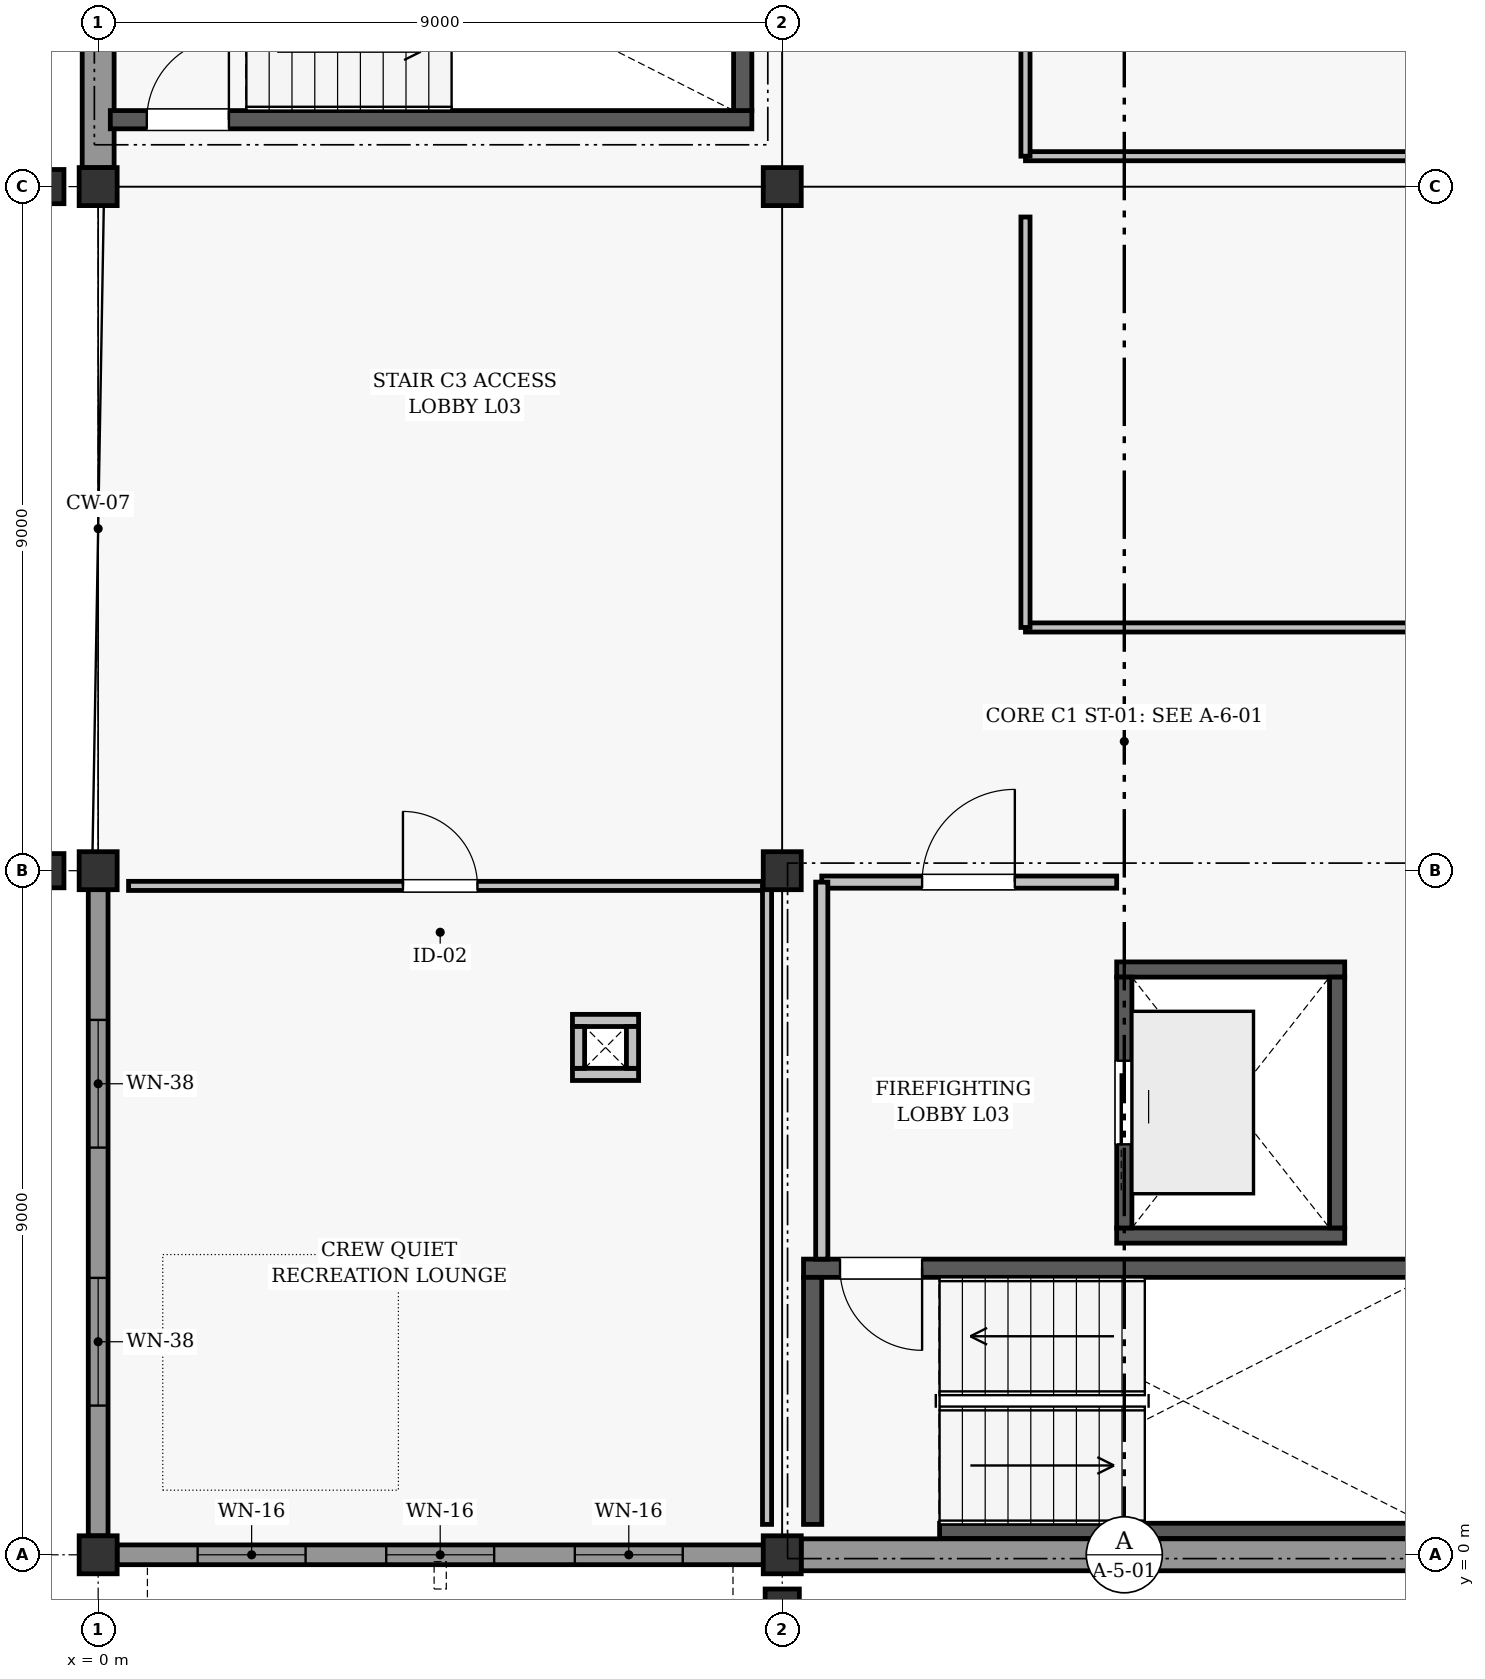
"""IFC4 building model, lengths in metres.
Left out: names, types, materials, properties, quantities, classifications, styles, units other than length and angle.
Written with IfcOpenShell. Run it as: python <this file> out.ifc"""

import sys

from ifc_helpers import new_model, si_unit, direction, frame, frame_2d, origin, origin_2d, place, context, subcontext, project, spatial, rectangle, extrude, element, fill, save


model = new_model("IFC4")
c1 = context("Model", 3, precision=1e-05, world=origin(), true_north=direction((0.0, 1.0)))
c2 = subcontext(c1, "Body", "Model", "MODEL_VIEW")
j1 = project(units=[si_unit("LENGTHUNIT", "METRE"), si_unit("PLANEANGLEUNIT", "RADIAN")], contexts=[c1])
p1 = place(None, origin())
s1 = spatial("IfcSite", under=j1, at=p1, CompositionType="ELEMENT")
p2 = place(p1, origin())
s2 = spatial("IfcBuilding", under=s1, at=p2, CompositionType="ELEMENT")
p3 = place(p2, frame((0.0, 0.0, 12.0)))
s3 = spatial("IfcBuildingStorey", under=s2, at=p3, CompositionType="ELEMENT", Elevation=12.0)
for number, where, z_axis, x_axis in (
    (1, (0.0, 0.0, 0.0), (0.0, 0.0, 1.0), (1.0, 0.0, 0.0)),
    (2, (0.0, 9.0, 0.0), (0.0, 0.0, 1.0), (1.0, 0.0, 0.0)),
    (3, (0.0, 18.0, 0.0), (0.0, 0.0, 1.0), (1.0, 0.0, 0.0)),
    (4, (9.0, 0.0, 0.0), (0.0, 0.0, 1.0), (1.0, 0.0, 0.0)),
    (5, (9.0, 9.0, 0.0), (0.0, 0.0, 1.0), (1.0, 0.0, 0.0)),
    (6, (9.0, 18.0, 0.0), (0.0, 0.0, 1.0), (1.0, 0.0, 0.0)),
):
    element("IfcColumn", number, at=place(p3, frame(where, z_axis=z_axis, x_axis=x_axis)), inside=s3, PredefinedType="COLUMN", context=c2, shape_type="SweptSolid", body=[
        extrude(rectangle(XDim=0.5, YDim=0.5, at=origin_2d()), origin(), (0.0, 0.0, 1.0), 3.0),
    ])
for number, where, z_axis, x_axis in (
    (7, (9.0, -0.75, 0.0), (0.0, 0.0, 1.0), (1.0, 0.0, 0.0)),
    (8, (-0.75, 9.0, 0.0), (0.0, 0.0, 1.0), (0.0, 1.0, 0.0)),
    (9, (-0.75, 18.0, 0.0), (0.0, 0.0, 1.0), (0.0, 1.0, 0.0)),
):
    element("IfcColumn", number, at=place(p3, frame(where, z_axis=z_axis, x_axis=x_axis)), inside=s3, PredefinedType="PILASTER", context=c2, shape_type="SweptSolid", body=[
        extrude(rectangle(XDim=0.45, YDim=0.6, at=origin_2d()), origin(), (0.0, 0.0, 1.0), 3.0),
    ])
p4 = place(p3, frame((0.248, 0.0, 0.0), z_axis=(0.0, 0.0, 1.0), x_axis=(1.0, 0.0, 0.0)))
e10 = element("IfcWall", 10, at=p4, inside=s3, PredefinedType="SOLIDWALL", context=c2, shape_type="SweptSolid", body=[
    extrude(rectangle(XDim=8.504, YDim=0.26, at=frame_2d((4.252, 0.0))), origin(), (0.0, 0.0, 1.0), 2.262),
])
p5 = place(p4, frame((1.061, 0.0, 0.8)))
e11 = element("IfcOpeningElement", 11, at=p5, cuts=e10, PredefinedType="OPENING", context=c2, shape_type="SweptSolid", body=[
    extrude(rectangle(XDim=1.42, YDim=1.16, at=frame_2d((0.71, 0.58))), frame((0.0, 0.14, 0.0), z_axis=(0.0, -1.0, 0.0), x_axis=(1.0, 0.0, 0.0)), (0.0, 0.0, 1.0), 0.28),
])
p6 = place(p4, frame((3.542, 0.0, 0.8)))
e12 = element("IfcOpeningElement", 12, at=p6, cuts=e10, PredefinedType="OPENING", context=c2, shape_type="SweptSolid", body=[
    extrude(rectangle(XDim=1.42, YDim=1.16, at=frame_2d((0.71, 0.58))), frame((0.0, 0.14, 0.0), z_axis=(0.0, -1.0, 0.0), x_axis=(1.0, 0.0, 0.0)), (0.0, 0.0, 1.0), 0.28),
])
p7 = place(p4, frame((6.023, 0.0, 0.8)))
e13 = element("IfcOpeningElement", 13, at=p7, cuts=e10, PredefinedType="OPENING", context=c2, shape_type="SweptSolid", body=[
    extrude(rectangle(XDim=1.42, YDim=1.16, at=frame_2d((0.71, 0.58))), frame((0.0, 0.14, 0.0), z_axis=(0.0, -1.0, 0.0), x_axis=(1.0, 0.0, 0.0)), (0.0, 0.0, 1.0), 0.28),
])
p8 = place(p3, frame((9.248, 0.0, 0.0), z_axis=(0.0, 0.0, 1.0), x_axis=(1.0, 0.0, 0.0)))
e14 = element("IfcWall", 14, at=p8, inside=s3, PredefinedType="SOLIDWALL", context=c2, shape_type="SweptSolid", body=[
    extrude(rectangle(XDim=8.504, YDim=0.42, at=frame_2d((4.252, 0.0))), origin(), (0.0, 0.0, 1.0), 2.262),
])
p9 = place(p3, frame((0.0, 0.248, 0.0), z_axis=(0.0, 0.0, 1.0), x_axis=(0.0, 1.0, 0.0)))
e15 = element("IfcWall", 15, at=p9, inside=s3, PredefinedType="SOLIDWALL", context=c2, shape_type="SweptSolid", body=[
    extrude(rectangle(XDim=8.504, YDim=0.26, at=frame_2d((4.252, 0.0))), origin(), (0.0, 0.0, 1.0), 2.242),
])
p10 = place(p9, frame((1.715, 0.0, 0.45)))
e16 = element("IfcOpeningElement", 16, at=p10, cuts=e15, PredefinedType="OPENING", context=c2, shape_type="SweptSolid", body=[
    extrude(rectangle(XDim=1.68, YDim=1.66, at=frame_2d((0.84, 0.83))), frame((0.0, 0.14, 0.0), z_axis=(0.0, -1.0, 0.0), x_axis=(1.0, 0.0, 0.0)), (0.0, 0.0, 1.0), 0.28),
])
p11 = place(p9, frame((5.109, 0.0, 0.45)))
e17 = element("IfcOpeningElement", 17, at=p11, cuts=e15, PredefinedType="OPENING", context=c2, shape_type="SweptSolid", body=[
    extrude(rectangle(XDim=1.68, YDim=1.66, at=frame_2d((0.84, 0.83))), frame((0.0, 0.14, 0.0), z_axis=(0.0, -1.0, 0.0), x_axis=(1.0, 0.0, 0.0)), (0.0, 0.0, 1.0), 0.28),
])
p12 = place(p3, frame((0.0, 18.248, 0.0), z_axis=(0.0, 0.0, 1.0), x_axis=(0.0, 1.0, 0.0)))
e18 = element("IfcWall", 18, at=p12, inside=s3, PredefinedType="SOLIDWALL", context=c2, shape_type="SweptSolid", body=[
    extrude(rectangle(XDim=8.504, YDim=0.42, at=frame_2d((4.252, 0.0))), origin(), (0.0, 0.0, 1.0), 2.242),
])
p13 = place(p3, frame((11.07, 0.315, 0.0), z_axis=(0.0, 0.0, 1.0), x_axis=(1.0, 0.0, 0.0)))
e19 = element("IfcWall", 19, at=p13, inside=s3, PredefinedType="SHEAR", context=c2, shape_type="SweptSolid", body=[
    extrude(rectangle(XDim=6.41, YDim=0.2, at=frame_2d((3.205, 0.0))), origin(), (0.0, 0.0, 1.0), 2.75),
])
p14 = place(p3, frame((9.28, 3.77, 0.0), z_axis=(0.0, 0.0, 1.0), x_axis=(1.0, 0.0, 0.0)))
e20 = element("IfcWall", 20, at=p14, inside=s3, PredefinedType="SHEAR", context=c2, shape_type="SweptSolid", body=[
    extrude(rectangle(XDim=8.44, YDim=0.24, at=frame_2d((4.22, 0.0))), origin(), (0.0, 0.0, 1.0), 2.75),
])
p15 = place(p14, frame((0.48, 0.0, 0.0)))
e21 = element("IfcOpeningElement", 21, at=p15, cuts=e20, PredefinedType="OPENING", context=c2, shape_type="SweptSolid", body=[
    extrude(rectangle(XDim=1.08, YDim=2.08, at=frame_2d((0.54, 1.04))), frame((0.0, 0.13, 0.0), z_axis=(0.0, -1.0, 0.0), x_axis=(1.0, 0.0, 0.0)), (0.0, 0.0, 1.0), 0.26),
])
p16 = place(p3, frame((9.4, 0.4, 0.0), z_axis=(0.0, 0.0, 1.0), x_axis=(0.0, 1.0, 0.0)))
e22 = element("IfcWall", 22, at=p16, inside=s3, PredefinedType="SHEAR", context=c2, shape_type="SweptSolid", body=[
    extrude(rectangle(XDim=3.25, YDim=0.24, at=frame_2d((1.625, 0.0))), origin(), (0.0, 0.0, 1.0), 2.75),
])
p17 = place(p3, frame((0.16, 18.88, 0.0), z_axis=(0.0, 0.0, 1.0), x_axis=(1.0, 0.0, 0.0)))
e23 = element("IfcWall", 23, at=p17, inside=s3, PredefinedType="SHEAR", context=c2, shape_type="SweptSolid", body=[
    extrude(rectangle(XDim=8.44, YDim=0.24, at=frame_2d((4.22, 0.0))), origin(), (0.0, 0.0, 1.0), 2.75),
])
p18 = place(p17, frame((0.48, 0.0, 0.0)))
e24 = element("IfcOpeningElement", 24, at=p18, cuts=e23, PredefinedType="OPENING", context=c2, shape_type="SweptSolid", body=[
    extrude(rectangle(XDim=1.08, YDim=2.08, at=frame_2d((0.54, 1.04))), frame((0.0, 0.13, 0.0), z_axis=(0.0, -1.0, 0.0), x_axis=(1.0, 0.0, 0.0)), (0.0, 0.0, 1.0), 0.26),
])
p19 = place(p3, frame((8.48, 19.0, 0.0), z_axis=(0.0, 0.0, 1.0), x_axis=(0.0, 1.0, 0.0)))
e25 = element("IfcWall", 25, at=p19, inside=s3, PredefinedType="SHEAR", context=c2, shape_type="SweptSolid", body=[
    extrude(rectangle(XDim=3.25, YDim=0.24, at=frame_2d((1.625, 0.0))), origin(), (0.0, 0.0, 1.0), 2.75),
])
for number, where, z_axis, x_axis in (
    (26, (13.4, 4.2, 0.0), (0.0, 0.0, 1.0), (1.0, 0.0, 0.0)),
    (27, (13.4, 7.7, 0.0), (0.0, 0.0, 1.0), (1.0, 0.0, 0.0)),
):
    element("IfcWall", number, at=place(p3, frame(where, z_axis=z_axis, x_axis=x_axis)), inside=s3, PredefinedType="SHEAR", context=c2, shape_type="SweptSolid", body=[
        extrude(rectangle(XDim=3.0, YDim=0.2, at=frame_2d((1.5, 0.0))), origin(), (0.0, 0.0, 1.0), 2.75),
    ])
p20 = place(p3, frame((13.5, 4.3, 0.0), z_axis=(0.0, 0.0, 1.0), x_axis=(0.0, 1.0, 0.0)))
e28 = element("IfcWall", 28, at=p20, inside=s3, PredefinedType="SHEAR", context=c2, shape_type="SweptSolid", body=[
    extrude(rectangle(XDim=3.3, YDim=0.2, at=frame_2d((1.65, 0.0))), origin(), (0.0, 0.0, 1.0), 2.75),
])
p21 = place(p20, frame((1.1, 0.0, 0.0)))
e29 = element("IfcOpeningElement", 29, at=p21, cuts=e28, PredefinedType="OPENING", context=c2, shape_type="SweptSolid", body=[
    extrude(rectangle(XDim=1.1, YDim=2.1, at=frame_2d((0.55, 1.05))), frame((0.0, 0.11, 0.0), z_axis=(0.0, -1.0, 0.0), x_axis=(1.0, 0.0, 0.0)), (0.0, 0.0, 1.0), 0.22),
])
p22 = place(p3, frame((16.3, 4.3, 0.0), z_axis=(0.0, 0.0, 1.0), x_axis=(0.0, 1.0, 0.0)))
e30 = element("IfcWall", 30, at=p22, inside=s3, PredefinedType="SHEAR", context=c2, shape_type="SweptSolid", body=[
    extrude(rectangle(XDim=3.3, YDim=0.2, at=frame_2d((1.65, 0.0))), origin(), (0.0, 0.0, 1.0), 2.75),
])
for number, where, z_axis, x_axis in (
    (31, (6.24, 6.32, 0.0), (0.0, 0.0, 1.0), (1.0, 0.0, 0.0)),
    (32, (6.24, 7.03, 0.0), (0.0, 0.0, 1.0), (1.0, 0.0, 0.0)),
):
    element("IfcWall", number, at=place(p3, frame(where, z_axis=z_axis, x_axis=x_axis)), inside=s3, PredefinedType="PARTITIONING", context=c2, shape_type="SweptSolid", body=[
        extrude(rectangle(XDim=0.87, YDim=0.16, at=frame_2d((0.435, 0.0))), origin(), (0.0, 0.0, 1.0), 2.75),
    ])
for number, where, z_axis, x_axis in (
    (33, (6.32, 6.4, 0.0), (0.0, 0.0, 1.0), (0.0, 1.0, 0.0)),
    (34, (7.03, 6.4, 0.0), (0.0, 0.0, 1.0), (0.0, 1.0, 0.0)),
):
    element("IfcWall", number, at=place(p3, frame(where, z_axis=z_axis, x_axis=x_axis)), inside=s3, PredefinedType="PARTITIONING", context=c2, shape_type="SweptSolid", body=[
        extrude(rectangle(XDim=0.55, YDim=0.16, at=frame_2d((0.275, 0.0))), origin(), (0.0, 0.0, 1.0), 2.75),
    ])
p23 = place(p3, frame((9.52, 8.85, 0.0), z_axis=(0.0, 0.0, 1.0), x_axis=(1.0, 0.0, 0.0)))
e35 = element("IfcWall", 35, at=p23, inside=s3, PredefinedType="PARTITIONING", context=c2, shape_type="SweptSolid", body=[
    extrude(rectangle(XDim=3.88, YDim=0.16, at=frame_2d((1.94, 0.0))), origin(), (0.0, 0.0, 1.0), 2.295),
])
p24 = place(p23, frame((1.32, 0.0, 0.0)))
e36 = element("IfcOpeningElement", 36, at=p24, cuts=e35, PredefinedType="OPENING", context=c2, shape_type="SweptSolid", body=[
    extrude(rectangle(XDim=1.22, YDim=2.12, at=frame_2d((0.61, 1.06))), frame((0.0, 0.09, 0.0), z_axis=(0.0, -1.0, 0.0), x_axis=(1.0, 0.0, 0.0)), (0.0, 0.0, 1.0), 0.18),
])
p25 = place(p3, frame((9.52, 3.89, 0.0), z_axis=(0.0, 0.0, 1.0), x_axis=(0.0, 1.0, 0.0)))
e37 = element("IfcWall", 37, at=p25, inside=s3, PredefinedType="PARTITIONING", context=c2, shape_type="SweptSolid", body=[
    extrude(rectangle(XDim=4.96, YDim=0.16, at=frame_2d((2.48, 0.0))), origin(), (0.0, 0.0, 1.0), 2.295),
])
p26 = place(p3, frame((0.4, 8.8, 0.0), z_axis=(0.0, 0.0, 1.0), x_axis=(1.0, 0.0, 0.0)))
e38 = element("IfcWall", 38, at=p26, inside=s3, PredefinedType="PARTITIONING", context=c2, shape_type="SweptSolid", body=[
    extrude(rectangle(XDim=8.4, YDim=0.12, at=frame_2d((4.2, 0.0))), origin(), (0.0, 0.0, 1.0), 2.295),
])
p27 = place(p26, frame((3.61, 0.0, 0.0)))
e39 = element("IfcOpeningElement", 39, at=p27, cuts=e38, PredefinedType="OPENING", context=c2, shape_type="SweptSolid", body=[
    extrude(rectangle(XDim=0.98, YDim=2.08, at=frame_2d((0.49, 1.04))), frame((0.0, 0.07, 0.0), z_axis=(0.0, -1.0, 0.0), x_axis=(1.0, 0.0, 0.0)), (0.0, 0.0, 1.0), 0.14),
])
p28 = place(p3, frame((8.8, 0.4, 0.0), z_axis=(0.0, 0.0, 1.0), x_axis=(0.0, 1.0, 0.0)))
e40 = element("IfcWall", 40, at=p28, inside=s3, PredefinedType="PARTITIONING", context=c2, shape_type="SweptSolid", body=[
    extrude(rectangle(XDim=8.4, YDim=0.12, at=frame_2d((4.2, 0.0))), origin(), (0.0, 0.0, 1.0), 2.295),
])
p29 = place(p3, frame((12.2, 12.2, 0.0), z_axis=(0.0, 0.0, 1.0), x_axis=(1.0, 0.0, 0.0)))
e41 = element("IfcWall", 41, at=p29, inside=s3, PredefinedType="PARTITIONING", context=c2, shape_type="SweptSolid", body=[
    extrude(rectangle(XDim=32.4, YDim=0.12, at=frame_2d((16.2, 0.0))), origin(), (0.0, 0.0, 1.0), 2.295),
])
p30 = place(p29, frame((18.43, 0.0, 0.0)))
e42 = element("IfcOpeningElement", 42, at=p30, cuts=e41, PredefinedType="OPENING", context=c2, shape_type="SweptSolid", body=[
    extrude(rectangle(XDim=1.74, YDim=2.18, at=frame_2d((0.87, 1.09))), frame((0.0, 0.07, 0.0), z_axis=(0.0, -1.0, 0.0), x_axis=(1.0, 0.0, 0.0)), (0.0, 0.0, 1.0), 0.14),
])
p31 = place(p3, frame((12.2, 12.2, 0.0), z_axis=(0.0, 0.0, 1.0), x_axis=(0.0, 1.0, 0.0)))
e43 = element("IfcWall", 43, at=p31, inside=s3, PredefinedType="PARTITIONING", context=c2, shape_type="SweptSolid", body=[
    extrude(rectangle(XDim=5.4, YDim=0.12, at=frame_2d((2.7, 0.0))), origin(), (0.0, 0.0, 1.0), 2.75),
])
p32 = place(p3, frame((12.2, 18.4, 0.0), z_axis=(0.0, 0.0, 1.0), x_axis=(1.0, 0.0, 0.0)))
e44 = element("IfcWall", 44, at=p32, inside=s3, PredefinedType="PARTITIONING", context=c2, shape_type="SweptSolid", body=[
    extrude(rectangle(XDim=14.4, YDim=0.12, at=frame_2d((7.2, 0.0))), origin(), (0.0, 0.0, 1.0), 2.245),
])
p33 = place(p3, frame((12.2, 18.4, 0.0), z_axis=(0.0, 0.0, 1.0), x_axis=(0.0, 1.0, 0.0)))
e45 = element("IfcWall", 45, at=p33, inside=s3, PredefinedType="PARTITIONING", context=c2, shape_type="SweptSolid", body=[
    extrude(rectangle(XDim=8.2, YDim=0.12, at=frame_2d((4.1, 0.0))), origin(), (0.0, 0.0, 1.0), 2.75),
])
p34 = place(p33, frame((3.61, 0.0, 0.0)))
e46 = element("IfcOpeningElement", 46, at=p34, cuts=e45, PredefinedType="OPENING", context=c2, shape_type="SweptSolid", body=[
    extrude(rectangle(XDim=0.98, YDim=2.08, at=frame_2d((0.49, 1.04))), frame((0.0, 0.07, 0.0), z_axis=(0.0, -1.0, 0.0), x_axis=(1.0, 0.0, 0.0)), (0.0, 0.0, 1.0), 0.14),
])
p35 = place(p5, origin())
e47 = element("IfcWindow", 47, at=p35, inside=s3, PartitioningType="SINGLE_PANEL", PredefinedType="WINDOW", context=c2, shape_type="SweptSolid", body=[
    extrude(rectangle(XDim=1.42, YDim=1.16, at=frame_2d((0.71, 0.58))), frame((0.0, 0.03, 0.0), z_axis=(0.0, -1.0, 0.0), x_axis=(1.0, 0.0, 0.0)), (0.0, 0.0, 1.0), 0.06),
])
fill(e11, e47)
p36 = place(p6, origin())
e48 = element("IfcWindow", 48, at=p36, inside=s3, PartitioningType="SINGLE_PANEL", PredefinedType="WINDOW", context=c2, shape_type="SweptSolid", body=[
    extrude(rectangle(XDim=1.42, YDim=1.16, at=frame_2d((0.71, 0.58))), frame((0.0, 0.03, 0.0), z_axis=(0.0, -1.0, 0.0), x_axis=(1.0, 0.0, 0.0)), (0.0, 0.0, 1.0), 0.06),
])
fill(e12, e48)
p37 = place(p7, origin())
e49 = element("IfcWindow", 49, at=p37, inside=s3, PartitioningType="SINGLE_PANEL", PredefinedType="WINDOW", context=c2, shape_type="SweptSolid", body=[
    extrude(rectangle(XDim=1.42, YDim=1.16, at=frame_2d((0.71, 0.58))), frame((0.0, 0.03, 0.0), z_axis=(0.0, -1.0, 0.0), x_axis=(1.0, 0.0, 0.0)), (0.0, 0.0, 1.0), 0.06),
])
fill(e13, e49)
p38 = place(p10, origin())
e50 = element("IfcWindow", 50, at=p38, inside=s3, PartitioningType="SINGLE_PANEL", PredefinedType="WINDOW", context=c2, shape_type="SweptSolid", body=[
    extrude(rectangle(XDim=1.68, YDim=1.66, at=frame_2d((0.84, 0.83))), frame((0.0, 0.03, 0.0), z_axis=(0.0, -1.0, 0.0), x_axis=(1.0, 0.0, 0.0)), (0.0, 0.0, 1.0), 0.06),
])
fill(e16, e50)
p39 = place(p11, origin())
e51 = element("IfcWindow", 51, at=p39, inside=s3, PartitioningType="SINGLE_PANEL", PredefinedType="WINDOW", context=c2, shape_type="SweptSolid", body=[
    extrude(rectangle(XDim=1.68, YDim=1.66, at=frame_2d((0.84, 0.83))), frame((0.0, 0.03, 0.0), z_axis=(0.0, -1.0, 0.0), x_axis=(1.0, 0.0, 0.0)), (0.0, 0.0, 1.0), 0.06),
])
fill(e17, e51)
p40 = place(p15, frame((1.08, 0.0, 0.0), z_axis=(0.0, 0.0, 1.0), x_axis=(-1.0, 0.0, 0.0)))
e52 = element("IfcDoor", 52, at=p40, inside=s3, OperationType="SINGLE_SWING_RIGHT", PredefinedType="DOOR", context=c2, shape_type="SweptSolid", body=[
    extrude(rectangle(XDim=1.08, YDim=2.08, at=frame_2d((0.54, 1.04))), frame((0.0, 0.025, 0.0), z_axis=(0.0, -1.0, 0.0), x_axis=(1.0, 0.0, 0.0)), (0.0, 0.0, 1.0), 0.05),
])
fill(e21, e52)
p41 = place(p18, origin())
e53 = element("IfcDoor", 53, at=p41, inside=s3, OperationType="SINGLE_SWING_RIGHT", PredefinedType="DOOR", context=c2, shape_type="SweptSolid", body=[
    extrude(rectangle(XDim=1.08, YDim=2.08, at=frame_2d((0.54, 1.04))), frame((0.0, 0.025, 0.0), z_axis=(0.0, -1.0, 0.0), x_axis=(1.0, 0.0, 0.0)), (0.0, 0.0, 1.0), 0.05),
])
fill(e24, e53)
p42 = place(p21, origin())
e54 = element("IfcDoor", 54, at=p42, inside=s3, OperationType="SLIDING_TO_LEFT", PredefinedType="DOOR", context=c2, shape_type="SweptSolid", body=[
    extrude(rectangle(XDim=1.1, YDim=2.1, at=frame_2d((0.55, 1.05))), frame((0.0, 0.025, 0.0), z_axis=(0.0, -1.0, 0.0), x_axis=(1.0, 0.0, 0.0)), (0.0, 0.0, 1.0), 0.05),
])
fill(e29, e54)
p43 = place(p24, origin())
e55 = element("IfcDoor", 55, at=p43, inside=s3, OperationType="SINGLE_SWING_RIGHT", PredefinedType="DOOR", context=c2, shape_type="SweptSolid", body=[
    extrude(rectangle(XDim=1.22, YDim=2.12, at=frame_2d((0.61, 1.06))), frame((0.0, 0.025, 0.0), z_axis=(0.0, -1.0, 0.0), x_axis=(1.0, 0.0, 0.0)), (0.0, 0.0, 1.0), 0.05),
])
fill(e36, e55)
p44 = place(p27, origin())
e56 = element("IfcDoor", 56, at=p44, inside=s3, OperationType="SINGLE_SWING_LEFT", PredefinedType="DOOR", context=c2, shape_type="SweptSolid", body=[
    extrude(rectangle(XDim=0.98, YDim=2.08, at=frame_2d((0.49, 1.04))), frame((0.0, 0.025, 0.0), z_axis=(0.0, -1.0, 0.0), x_axis=(1.0, 0.0, 0.0)), (0.0, 0.0, 1.0), 0.05),
])
fill(e39, e56)
save(model, sys.argv[1])
